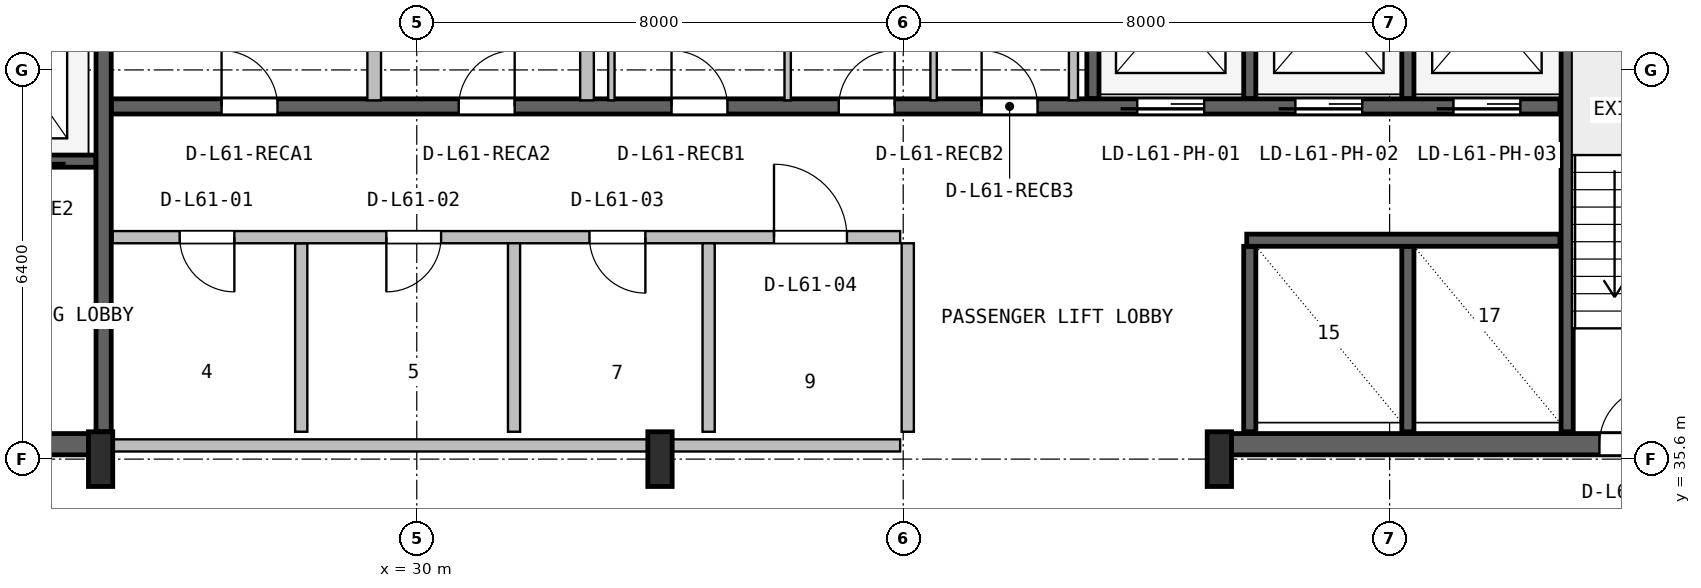
"""IFC4 building model, lengths in metres.
Left out: names, types, materials, properties, quantities, classifications, styles, units other than length and angle.
Written with IfcOpenShell. Run it as: python <this file> out.ifc"""

import sys

from ifc_helpers import new_model, si_unit, direction, frame, frame_2d, origin, origin_2d, place, context, subcontext, project, spatial, rectangle, i_section, extrude, source, transform, mapped, element, fill, save


model = new_model("IFC4")
c1 = context("Model", 3, precision=1e-05, world=origin(), true_north=direction((0.0, 1.0)))
c2 = subcontext(c1, "Body", "Model", "MODEL_VIEW")
j1 = project(units=[si_unit("LENGTHUNIT", "METRE"), si_unit("PLANEANGLEUNIT", "RADIAN")], contexts=[c1])
p1 = place(None, origin())
s1 = spatial("IfcSite", under=j1, at=p1, CompositionType="ELEMENT")
p2 = place(p1, origin())
s2 = spatial("IfcBuilding", under=s1, at=p2, CompositionType="ELEMENT")
p3 = place(p2, frame((0.0, 0.0, 247.0)))
s3 = spatial("IfcBuildingStorey", under=s2, at=p3, CompositionType="ELEMENT", Elevation=247.0)
p4 = place(p3, frame((15.67, 35.845, 0.0), z_axis=(0.0, 0.0, 1.0), x_axis=(1.0, 0.0, 0.0)))
e1 = element("IfcWall", 1, at=p4, inside=s3, PredefinedType="SHEAR", context=c2, shape_type="SweptSolid", body=[
    extrude(rectangle(XDim=9.13, YDim=0.35, at=frame_2d((4.565, 0.0))), origin(), (0.0, 0.0, 1.0), 3.55),
])
p5 = place(p4, frame((5.4, 0.0, 0.0)))
e2 = element("IfcOpeningElement", 2, at=p5, cuts=e1, PredefinedType="OPENING", context=c2, shape_type="SweptSolid", body=[
    extrude(rectangle(XDim=1.0, YDim=2.1, at=frame_2d((0.5, 1.05))), frame((0.0, 0.185, 0.0), z_axis=(0.0, -1.0, 0.0), x_axis=(1.0, 0.0, 0.0)), (0.0, 0.0, 1.0), 0.37),
])
p6 = place(p3, frame((43.2, 35.845, 0.0), z_axis=(0.0, 0.0, 1.0), x_axis=(1.0, 0.0, 0.0)))
e3 = element("IfcWall", 3, at=p6, inside=s3, PredefinedType="SHEAR", context=c2, shape_type="SweptSolid", body=[
    extrude(rectangle(XDim=9.13, YDim=0.35, at=frame_2d((4.565, 0.0))), origin(), (0.0, 0.0, 1.0), 3.55),
])
p7 = place(p6, frame((6.25, 0.0, 0.0)))
e4 = element("IfcOpeningElement", 4, at=p7, cuts=e3, PredefinedType="OPENING", context=c2, shape_type="SweptSolid", body=[
    extrude(rectangle(XDim=0.95, YDim=2.1, at=frame_2d((0.475, 1.05))), frame((0.0, 0.185, 0.0), z_axis=(0.0, -1.0, 0.0), x_axis=(1.0, 0.0, 0.0)), (0.0, 0.0, 1.0), 0.37),
])
m1 = source(origin(), c2, "Body", "SweptSolid", [
    extrude(i_section(OverallWidth=0.4, OverallDepth=0.9, WebThickness=0.016, FlangeThickness=0.028, FilletRadius=0.016, at=origin_2d()), origin(), (0.0, 0.0, 1.0), 3.8),
])
for number, where, z_axis, x_axis in (
    (5, (24.8, 35.6, 0.0), (0.0, 0.0, 1.0), (1.0, 0.0, 0.0)),
    (6, (34.0, 35.6, 0.0), (0.0, 0.0, 1.0), (1.0, 0.0, 0.0)),
    (7, (43.2, 35.6, 0.0), (0.0, 0.0, 1.0), (1.0, 0.0, 0.0)),
):
    element("IfcColumn", number, at=place(p3, frame(where, z_axis=z_axis, x_axis=x_axis)), inside=s3, PredefinedType="COLUMN", context=c2, shape_type="MappedRepresentation", body=[
        mapped(m1, transform((0.0, 0.0, 0.0), x_axis=(1.0, 0.0, 0.0), y_axis=(0.0, 1.0, 0.0), z_axis=(0.0, 0.0, 1.0), scale=1.0)),
    ])
p8 = place(p3, frame((24.85, 36.05, 0.0), z_axis=(0.0, 0.0, 1.0), x_axis=(0.0, 1.0, 0.0)))
e8 = element("IfcWall", 8, at=p8, inside=s3, PredefinedType="SHEAR", context=c2, shape_type="SweptSolid", body=[
    extrude(rectangle(XDim=10.45, YDim=0.25, at=frame_2d((5.225, 0.0))), origin(), (0.0, 0.0, 1.0), 3.55),
])
p9 = place(p3, frame((19.2, 40.5, 0.0), z_axis=(0.0, 0.0, 1.0), x_axis=(1.0, 0.0, 0.0)))
e9 = element("IfcWall", 9, at=p9, inside=s3, PredefinedType="SHEAR", context=c2, shape_type="SweptSolid", body=[
    extrude(rectangle(XDim=5.52, YDim=0.2, at=frame_2d((2.76, 0.0))), origin(), (0.0, 0.0, 1.0), 3.55),
])
p10 = place(p9, frame((1.05, 0.0, 0.0)))
e10 = element("IfcOpeningElement", 10, at=p10, cuts=e9, PredefinedType="OPENING", context=c2, shape_type="SweptSolid", body=[
    extrude(rectangle(XDim=1.1, YDim=2.18, at=frame_2d((0.55, 1.09))), frame((0.0, 0.11, 0.0), z_axis=(0.0, -1.0, 0.0), x_axis=(1.0, 0.0, 0.0)), (0.0, 0.0, 1.0), 0.22),
])
p11 = place(p9, frame((3.65, 0.0, 0.0)))
e11 = element("IfcOpeningElement", 11, at=p11, cuts=e9, PredefinedType="OPENING", context=c2, shape_type="SweptSolid", body=[
    extrude(rectangle(XDim=1.1, YDim=2.18, at=frame_2d((0.55, 1.09))), frame((0.0, 0.11, 0.0), z_axis=(0.0, -1.0, 0.0), x_axis=(1.0, 0.0, 0.0)), (0.0, 0.0, 1.0), 0.22),
])
p12 = place(p3, frame((48.92, 36.05, 0.0), z_axis=(0.0, 0.0, 1.0), x_axis=(0.0, 1.0, 0.0)))
e12 = element("IfcWall", 12, at=p12, inside=s3, PredefinedType="SHEAR", context=c2, shape_type="SweptSolid", body=[
    extrude(rectangle(XDim=10.5, YDim=0.2, at=frame_2d((5.25, 0.0))), origin(), (0.0, 0.0, 1.0), 3.55),
])
p13 = place(p3, frame((24.98, 41.4, 0.0), z_axis=(0.0, 0.0, 1.0), x_axis=(1.0, 0.0, 0.0)))
e13 = element("IfcWall", 13, at=p13, inside=s3, PredefinedType="SHEAR", context=c2, shape_type="SweptSolid", body=[
    extrude(rectangle(XDim=23.82, YDim=0.25, at=frame_2d((11.91, 0.0))), origin(), (0.0, 0.0, 1.0), 3.55),
])
p14 = place(p13, frame((16.87, 0.0, 0.0)))
e14 = element("IfcOpeningElement", 14, at=p14, cuts=e13, PredefinedType="OPENING", context=c2, shape_type="SweptSolid", body=[
    extrude(rectangle(XDim=1.1, YDim=2.18, at=frame_2d((0.55, 1.09))), frame((0.0, 0.135, 0.0), z_axis=(0.0, -1.0, 0.0), x_axis=(1.0, 0.0, 0.0)), (0.0, 0.0, 1.0), 0.27),
])
p15 = place(p13, frame((19.47, 0.0, 0.0)))
e15 = element("IfcOpeningElement", 15, at=p15, cuts=e13, PredefinedType="OPENING", context=c2, shape_type="SweptSolid", body=[
    extrude(rectangle(XDim=1.1, YDim=2.18, at=frame_2d((0.55, 1.09))), frame((0.0, 0.135, 0.0), z_axis=(0.0, -1.0, 0.0), x_axis=(1.0, 0.0, 0.0)), (0.0, 0.0, 1.0), 0.27),
])
p16 = place(p13, frame((22.07, 0.0, 0.0)))
e16 = element("IfcOpeningElement", 16, at=p16, cuts=e13, PredefinedType="OPENING", context=c2, shape_type="SweptSolid", body=[
    extrude(rectangle(XDim=1.1, YDim=2.18, at=frame_2d((0.55, 1.09))), frame((0.0, 0.135, 0.0), z_axis=(0.0, -1.0, 0.0), x_axis=(1.0, 0.0, 0.0)), (0.0, 0.0, 1.0), 0.27),
])
p17 = place(p13, frame((1.81, 0.0, 0.0)))
e17 = element("IfcOpeningElement", 17, at=p17, cuts=e13, PredefinedType="OPENING", context=c2, shape_type="SweptSolid", body=[
    extrude(rectangle(XDim=0.92, YDim=2.08, at=frame_2d((0.46, 1.04))), frame((0.0, 0.135, 0.0), z_axis=(0.0, -1.0, 0.0), x_axis=(1.0, 0.0, 0.0)), (0.0, 0.0, 1.0), 0.27),
])
p18 = place(p13, frame((5.71, 0.0, 0.0)))
e18 = element("IfcOpeningElement", 18, at=p18, cuts=e13, PredefinedType="OPENING", context=c2, shape_type="SweptSolid", body=[
    extrude(rectangle(XDim=0.92, YDim=2.08, at=frame_2d((0.46, 1.04))), frame((0.0, 0.135, 0.0), z_axis=(0.0, -1.0, 0.0), x_axis=(1.0, 0.0, 0.0)), (0.0, 0.0, 1.0), 0.27),
])
p19 = place(p13, frame((9.21, 0.0, 0.0)))
e19 = element("IfcOpeningElement", 19, at=p19, cuts=e13, PredefinedType="OPENING", context=c2, shape_type="SweptSolid", body=[
    extrude(rectangle(XDim=0.92, YDim=2.08, at=frame_2d((0.46, 1.04))), frame((0.0, 0.135, 0.0), z_axis=(0.0, -1.0, 0.0), x_axis=(1.0, 0.0, 0.0)), (0.0, 0.0, 1.0), 0.27),
])
p20 = place(p13, frame((11.96, 0.0, 0.0)))
e20 = element("IfcOpeningElement", 20, at=p20, cuts=e13, PredefinedType="OPENING", context=c2, shape_type="SweptSolid", body=[
    extrude(rectangle(XDim=0.92, YDim=2.08, at=frame_2d((0.46, 1.04))), frame((0.0, 0.135, 0.0), z_axis=(0.0, -1.0, 0.0), x_axis=(1.0, 0.0, 0.0)), (0.0, 0.0, 1.0), 0.27),
])
p21 = place(p13, frame((14.31, 0.0, 0.0)))
e21 = element("IfcOpeningElement", 21, at=p21, cuts=e13, PredefinedType="OPENING", context=c2, shape_type="SweptSolid", body=[
    extrude(rectangle(XDim=0.92, YDim=2.08, at=frame_2d((0.46, 1.04))), frame((0.0, 0.135, 0.0), z_axis=(0.0, -1.0, 0.0), x_axis=(1.0, 0.0, 0.0)), (0.0, 0.0, 1.0), 0.27),
])
p22 = place(p3, frame((41.12, 41.53, 0.0), z_axis=(0.0, 0.0, 1.0), x_axis=(0.0, 1.0, 0.0)))
e22 = element("IfcWall", 22, at=p22, inside=s3, PredefinedType="SHEAR", context=c2, shape_type="SweptSolid", body=[
    extrude(rectangle(XDim=5.02, YDim=0.2, at=frame_2d((2.51, 0.0))), origin(), (0.0, 0.0, 1.0), 3.55),
])
for number, where, z_axis, x_axis in (
    (23, (43.7, 41.53, 0.0), (0.0, 0.0, 1.0), (0.0, 1.0, 0.0)),
    (24, (46.3, 41.53, 0.0), (0.0, 0.0, 1.0), (0.0, 1.0, 0.0)),
):
    element("IfcWall", number, at=place(p3, frame(where, z_axis=z_axis, x_axis=x_axis)), inside=s3, PredefinedType="SHEAR", context=c2, shape_type="SweptSolid", body=[
        extrude(rectangle(XDim=2.87, YDim=0.2, at=frame_2d((1.435, 0.0))), origin(), (0.0, 0.0, 1.0), 3.55),
    ])
for number, where, z_axis, x_axis in (
    (25, (43.7, 36.05, 0.0), (0.0, 0.0, 1.0), (0.0, 1.0, 0.0)),
    (26, (46.3, 36.05, 0.0), (0.0, 0.0, 1.0), (0.0, 1.0, 0.0)),
):
    element("IfcWall", number, at=place(p3, frame(where, z_axis=z_axis, x_axis=x_axis)), inside=s3, PredefinedType="SHEAR", context=c2, shape_type="SweptSolid", body=[
        extrude(rectangle(XDim=3.05, YDim=0.2, at=frame_2d((1.525, 0.0))), origin(), (0.0, 0.0, 1.0), 3.55),
    ])
p23 = place(p3, frame((43.65, 39.2, 0.0), z_axis=(0.0, 0.0, 1.0), x_axis=(1.0, 0.0, 0.0)))
e27 = element("IfcWall", 27, at=p23, inside=s3, PredefinedType="SHEAR", context=c2, shape_type="SweptSolid", body=[
    extrude(rectangle(XDim=5.15, YDim=0.2, at=frame_2d((2.575, 0.0))), origin(), (0.0, 0.0, 1.0), 3.55),
])
p24 = place(p3, frame((25.0, 35.825, 0.0), z_axis=(0.0, 0.0, 1.0), x_axis=(1.0, 0.0, 0.0)))
e28 = element("IfcWall", 28, at=p24, inside=s3, PredefinedType="SOLIDWALL", context=c2, shape_type="SweptSolid", body=[
    extrude(rectangle(XDim=12.95, YDim=0.2, at=frame_2d((6.475, 0.0))), origin(), (0.0, 0.0, 1.0), 2.575),
])
p25 = place(p3, frame((28.1, 36.05, 0.0), z_axis=(0.0, 0.0, 1.0), x_axis=(0.0, 1.0, 0.0)))
e29 = element("IfcWall", 29, at=p25, inside=s3, PredefinedType="PLUMBINGWALL", context=c2, shape_type="SweptSolid", body=[
    extrude(rectangle(XDim=3.1, YDim=0.2, at=frame_2d((1.55, 0.0))), origin(), (0.0, 0.0, 1.0), 3.53),
])
p26 = place(p3, frame((25.0, 39.25, 0.0), z_axis=(0.0, 0.0, 1.0), x_axis=(1.0, 0.0, 0.0)))
e30 = element("IfcWall", 30, at=p26, inside=s3, PredefinedType="SOLIDWALL", context=c2, shape_type="SweptSolid", body=[
    extrude(rectangle(XDim=12.95, YDim=0.2, at=frame_2d((6.475, 0.0))), origin(), (0.0, 0.0, 1.0), 3.53),
])
p27 = place(p26, frame((1.1, 0.0, 0.0)))
e31 = element("IfcOpeningElement", 31, at=p27, cuts=e30, PredefinedType="OPENING", context=c2, shape_type="SweptSolid", body=[
    extrude(rectangle(XDim=0.9, YDim=2.06, at=frame_2d((0.45, 1.03))), frame((0.0, 0.11, 0.0), z_axis=(0.0, -1.0, 0.0), x_axis=(1.0, 0.0, 0.0)), (0.0, 0.0, 1.0), 0.22),
])
p28 = place(p26, frame((4.5, 0.0, 0.0)))
e32 = element("IfcOpeningElement", 32, at=p28, cuts=e30, PredefinedType="OPENING", context=c2, shape_type="SweptSolid", body=[
    extrude(rectangle(XDim=0.9, YDim=2.06, at=frame_2d((0.45, 1.03))), frame((0.0, 0.11, 0.0), z_axis=(0.0, -1.0, 0.0), x_axis=(1.0, 0.0, 0.0)), (0.0, 0.0, 1.0), 0.22),
])
p29 = place(p26, frame((7.84, 0.0, 0.0)))
e33 = element("IfcOpeningElement", 33, at=p29, cuts=e30, PredefinedType="OPENING", context=c2, shape_type="SweptSolid", body=[
    extrude(rectangle(XDim=0.92, YDim=2.08, at=frame_2d((0.46, 1.04))), frame((0.0, 0.11, 0.0), z_axis=(0.0, -1.0, 0.0), x_axis=(1.0, 0.0, 0.0)), (0.0, 0.0, 1.0), 0.22),
])
p30 = place(p26, frame((10.875, 0.0, 0.0)))
e34 = element("IfcOpeningElement", 34, at=p30, cuts=e30, PredefinedType="OPENING", context=c2, shape_type="SweptSolid", body=[
    extrude(rectangle(XDim=1.2, YDim=2.1, at=frame_2d((0.6, 1.05))), frame((0.0, 0.11, 0.0), z_axis=(0.0, -1.0, 0.0), x_axis=(1.0, 0.0, 0.0)), (0.0, 0.0, 1.0), 0.22),
])
p31 = place(p3, frame((31.6, 36.05, 0.0), z_axis=(0.0, 0.0, 1.0), x_axis=(0.0, 1.0, 0.0)))
e35 = element("IfcWall", 35, at=p31, inside=s3, PredefinedType="PLUMBINGWALL", context=c2, shape_type="SweptSolid", body=[
    extrude(rectangle(XDim=3.1, YDim=0.2, at=frame_2d((1.55, 0.0))), origin(), (0.0, 0.0, 1.0), 3.53),
])
for number, where, z_axis, x_axis in (
    (36, (34.8, 36.05, 0.0), (0.0, 0.0, 1.0), (0.0, 1.0, 0.0)),
    (37, (38.075, 36.05, 0.0), (0.0, 0.0, 1.0), (0.0, 1.0, 0.0)),
):
    element("IfcWall", number, at=place(p3, frame(where, z_axis=z_axis, x_axis=x_axis)), inside=s3, PredefinedType="SOLIDWALL", context=c2, shape_type="SweptSolid", body=[
        extrude(rectangle(XDim=3.1, YDim=0.2, at=frame_2d((1.55, 0.0))), origin(), (0.0, 0.0, 1.0), 3.53),
    ])
p32 = place(p3, frame((29.3, 41.5, 0.0), z_axis=(0.0, 0.0, 1.0), x_axis=(0.0, 1.0, 0.0)))
e38 = element("IfcWall", 38, at=p32, inside=s3, PredefinedType="PARTITIONING", context=c2, shape_type="SweptSolid", body=[
    extrude(rectangle(XDim=2.288, YDim=0.225, at=frame_2d((1.144, 0.0))), origin(), (0.0, 0.0, 1.0), 3.53),
])
p33 = place(p3, frame((32.8, 41.5, 0.0), z_axis=(0.0, 0.0, 1.0), x_axis=(0.0, 1.0, 0.0)))
e39 = element("IfcWall", 39, at=p33, inside=s3, PredefinedType="PARTITIONING", context=c2, shape_type="SweptSolid", body=[
    extrude(rectangle(XDim=5.02, YDim=0.225, at=frame_2d((2.51, 0.0))), origin(), (0.0, 0.0, 1.0), 3.53),
])
for number, where, z_axis, x_axis in (
    (40, (36.1, 41.5, 0.0), (0.0, 0.0, 1.0), (0.0, 1.0, 0.0)),
    (41, (33.2, 41.5, 0.0), (0.0, 0.0, 1.0), (0.0, 1.0, 0.0)),
    (42, (38.5, 41.5, 0.0), (0.0, 0.0, 1.0), (0.0, 1.0, 0.0)),
):
    element("IfcWall", number, at=place(p3, frame(where, z_axis=z_axis, x_axis=x_axis)), inside=s3, PredefinedType="PARTITIONING", context=c2, shape_type="SweptSolid", body=[
        extrude(rectangle(XDim=5.02, YDim=0.105, at=frame_2d((2.51, 0.0))), origin(), (0.0, 0.0, 1.0), 3.53),
    ])
p34 = place(p3, frame((40.8, 41.5, 0.0), z_axis=(0.0, 0.0, 1.0), x_axis=(0.0, 1.0, 0.0)))
e43 = element("IfcWall", 43, at=p34, inside=s3, PredefinedType="PARTITIONING", context=c2, shape_type="SweptSolid", body=[
    extrude(rectangle(XDim=5.02, YDim=0.15, at=frame_2d((2.51, 0.0))), origin(), (0.0, 0.0, 1.0), 3.53),
])
m2 = source(origin(), c2, "Body", "SweptSolid", [
    extrude(rectangle(XDim=0.95, YDim=2.1, at=frame_2d((0.475, 1.05))), frame((0.0, 0.025, 0.0), z_axis=(0.0, -1.0, 0.0), x_axis=(1.0, 0.0, 0.0)), (0.0, 0.0, 1.0), 0.05),
])
p35 = place(p7, origin())
e44 = element("IfcDoor", 44, at=p35, inside=s3, OperationType="SINGLE_SWING_RIGHT", PredefinedType="DOOR", context=c2, shape_type="MappedRepresentation", body=[
    mapped(m2, transform((0.0, 0.0, 0.0), x_axis=(1.0, 0.0, 0.0), y_axis=(0.0, 1.0, 0.0), z_axis=(0.0, 0.0, 1.0), scale=1.0)),
])
fill(e4, e44)
m3 = source(origin(), c2, "Body", "SweptSolid", [
    extrude(rectangle(XDim=1.1, YDim=2.18, at=frame_2d((0.55, 1.09))), frame((0.0, 0.025, 0.0), z_axis=(0.0, -1.0, 0.0), x_axis=(1.0, 0.0, 0.0)), (0.0, 0.0, 1.0), 0.05),
])
p36 = place(p14, frame((1.1, 0.0, 0.0), z_axis=(0.0, 0.0, 1.0), x_axis=(-1.0, 0.0, 0.0)))
e45 = element("IfcDoor", 45, at=p36, inside=s3, OperationType="SLIDING_TO_LEFT", PredefinedType="DOOR", context=c2, shape_type="MappedRepresentation", body=[
    mapped(m3, transform((0.0, 0.0, 0.0), x_axis=(1.0, 0.0, 0.0), y_axis=(0.0, 1.0, 0.0), z_axis=(0.0, 0.0, 1.0), scale=1.0)),
])
fill(e14, e45)
p37 = place(p15, frame((1.1, 0.0, 0.0), z_axis=(0.0, 0.0, 1.0), x_axis=(-1.0, 0.0, 0.0)))
e46 = element("IfcDoor", 46, at=p37, inside=s3, OperationType="SLIDING_TO_LEFT", PredefinedType="DOOR", context=c2, shape_type="MappedRepresentation", body=[
    mapped(m3, transform((0.0, 0.0, 0.0), x_axis=(1.0, 0.0, 0.0), y_axis=(0.0, 1.0, 0.0), z_axis=(0.0, 0.0, 1.0), scale=1.0)),
])
fill(e15, e46)
p38 = place(p16, frame((1.1, 0.0, 0.0), z_axis=(0.0, 0.0, 1.0), x_axis=(-1.0, 0.0, 0.0)))
e47 = element("IfcDoor", 47, at=p38, inside=s3, OperationType="SLIDING_TO_LEFT", PredefinedType="DOOR", context=c2, shape_type="MappedRepresentation", body=[
    mapped(m3, transform((0.0, 0.0, 0.0), x_axis=(1.0, 0.0, 0.0), y_axis=(0.0, 1.0, 0.0), z_axis=(0.0, 0.0, 1.0), scale=1.0)),
])
fill(e16, e47)
m4 = source(origin(), c2, "Body", "SweptSolid", [
    extrude(rectangle(XDim=0.92, YDim=2.08, at=frame_2d((0.46, 1.04))), frame((0.0, 0.025, 0.0), z_axis=(0.0, -1.0, 0.0), x_axis=(1.0, 0.0, 0.0)), (0.0, 0.0, 1.0), 0.05),
])
p39 = place(p17, origin())
e48 = element("IfcDoor", 48, at=p39, inside=s3, OperationType="SINGLE_SWING_LEFT", PredefinedType="DOOR", context=c2, shape_type="MappedRepresentation", body=[
    mapped(m4, transform((0.0, 0.0, 0.0), x_axis=(1.0, 0.0, 0.0), y_axis=(0.0, 1.0, 0.0), z_axis=(0.0, 0.0, 1.0), scale=1.0)),
])
fill(e17, e48)
p40 = place(p18, origin())
e49 = element("IfcDoor", 49, at=p40, inside=s3, OperationType="SINGLE_SWING_RIGHT", PredefinedType="DOOR", context=c2, shape_type="MappedRepresentation", body=[
    mapped(m4, transform((0.0, 0.0, 0.0), x_axis=(1.0, 0.0, 0.0), y_axis=(0.0, 1.0, 0.0), z_axis=(0.0, 0.0, 1.0), scale=1.0)),
])
fill(e18, e49)
p41 = place(p19, origin())
e50 = element("IfcDoor", 50, at=p41, inside=s3, OperationType="SINGLE_SWING_LEFT", PredefinedType="DOOR", context=c2, shape_type="MappedRepresentation", body=[
    mapped(m4, transform((0.0, 0.0, 0.0), x_axis=(1.0, 0.0, 0.0), y_axis=(0.0, 1.0, 0.0), z_axis=(0.0, 0.0, 1.0), scale=1.0)),
])
fill(e19, e50)
p42 = place(p20, origin())
e51 = element("IfcDoor", 51, at=p42, inside=s3, OperationType="SINGLE_SWING_RIGHT", PredefinedType="DOOR", context=c2, shape_type="MappedRepresentation", body=[
    mapped(m4, transform((0.0, 0.0, 0.0), x_axis=(1.0, 0.0, 0.0), y_axis=(0.0, 1.0, 0.0), z_axis=(0.0, 0.0, 1.0), scale=1.0)),
])
fill(e20, e51)
p43 = place(p21, origin())
e52 = element("IfcDoor", 52, at=p43, inside=s3, OperationType="SINGLE_SWING_LEFT", PredefinedType="DOOR", context=c2, shape_type="MappedRepresentation", body=[
    mapped(m4, transform((0.0, 0.0, 0.0), x_axis=(1.0, 0.0, 0.0), y_axis=(0.0, 1.0, 0.0), z_axis=(0.0, 0.0, 1.0), scale=1.0)),
])
fill(e21, e52)
m5 = source(origin(), c2, "Body", "SweptSolid", [
    extrude(rectangle(XDim=0.9, YDim=2.06, at=frame_2d((0.45, 1.03))), frame((0.0, 0.025, 0.0), z_axis=(0.0, -1.0, 0.0), x_axis=(1.0, 0.0, 0.0)), (0.0, 0.0, 1.0), 0.05),
])
p44 = place(p27, frame((0.9, 0.0, 0.0), z_axis=(0.0, 0.0, 1.0), x_axis=(-1.0, 0.0, 0.0)))
e53 = element("IfcDoor", 53, at=p44, inside=s3, OperationType="SINGLE_SWING_RIGHT", PredefinedType="DOOR", context=c2, shape_type="MappedRepresentation", body=[
    mapped(m5, transform((0.0, 0.0, 0.0), x_axis=(1.0, 0.0, 0.0), y_axis=(0.0, 1.0, 0.0), z_axis=(0.0, 0.0, 1.0), scale=1.0)),
])
fill(e31, e53)
p45 = place(p28, frame((0.9, 0.0, 0.0), z_axis=(0.0, 0.0, 1.0), x_axis=(-1.0, 0.0, 0.0)))
e54 = element("IfcDoor", 54, at=p45, inside=s3, OperationType="SINGLE_SWING_LEFT", PredefinedType="DOOR", context=c2, shape_type="MappedRepresentation", body=[
    mapped(m5, transform((0.0, 0.0, 0.0), x_axis=(1.0, 0.0, 0.0), y_axis=(0.0, 1.0, 0.0), z_axis=(0.0, 0.0, 1.0), scale=1.0)),
])
fill(e32, e54)
p46 = place(p29, frame((0.92, 0.0, 0.0), z_axis=(0.0, 0.0, 1.0), x_axis=(-1.0, 0.0, 0.0)))
e55 = element("IfcDoor", 55, at=p46, inside=s3, OperationType="SINGLE_SWING_RIGHT", PredefinedType="DOOR", context=c2, shape_type="MappedRepresentation", body=[
    mapped(m4, transform((0.0, 0.0, 0.0), x_axis=(1.0, 0.0, 0.0), y_axis=(0.0, 1.0, 0.0), z_axis=(0.0, 0.0, 1.0), scale=1.0)),
])
fill(e33, e55)
m6 = source(origin(), c2, "Body", "SweptSolid", [
    extrude(rectangle(XDim=1.2, YDim=2.1, at=frame_2d((0.6, 1.05))), frame((0.0, 0.025, 0.0), z_axis=(0.0, -1.0, 0.0), x_axis=(1.0, 0.0, 0.0)), (0.0, 0.0, 1.0), 0.05),
])
p47 = place(p30, origin())
e56 = element("IfcDoor", 56, at=p47, inside=s3, OperationType="SINGLE_SWING_LEFT", PredefinedType="DOOR", context=c2, shape_type="MappedRepresentation", body=[
    mapped(m6, transform((0.0, 0.0, 0.0), x_axis=(1.0, 0.0, 0.0), y_axis=(0.0, 1.0, 0.0), z_axis=(0.0, 0.0, 1.0), scale=1.0)),
])
fill(e34, e56)
save(model, sys.argv[1])
